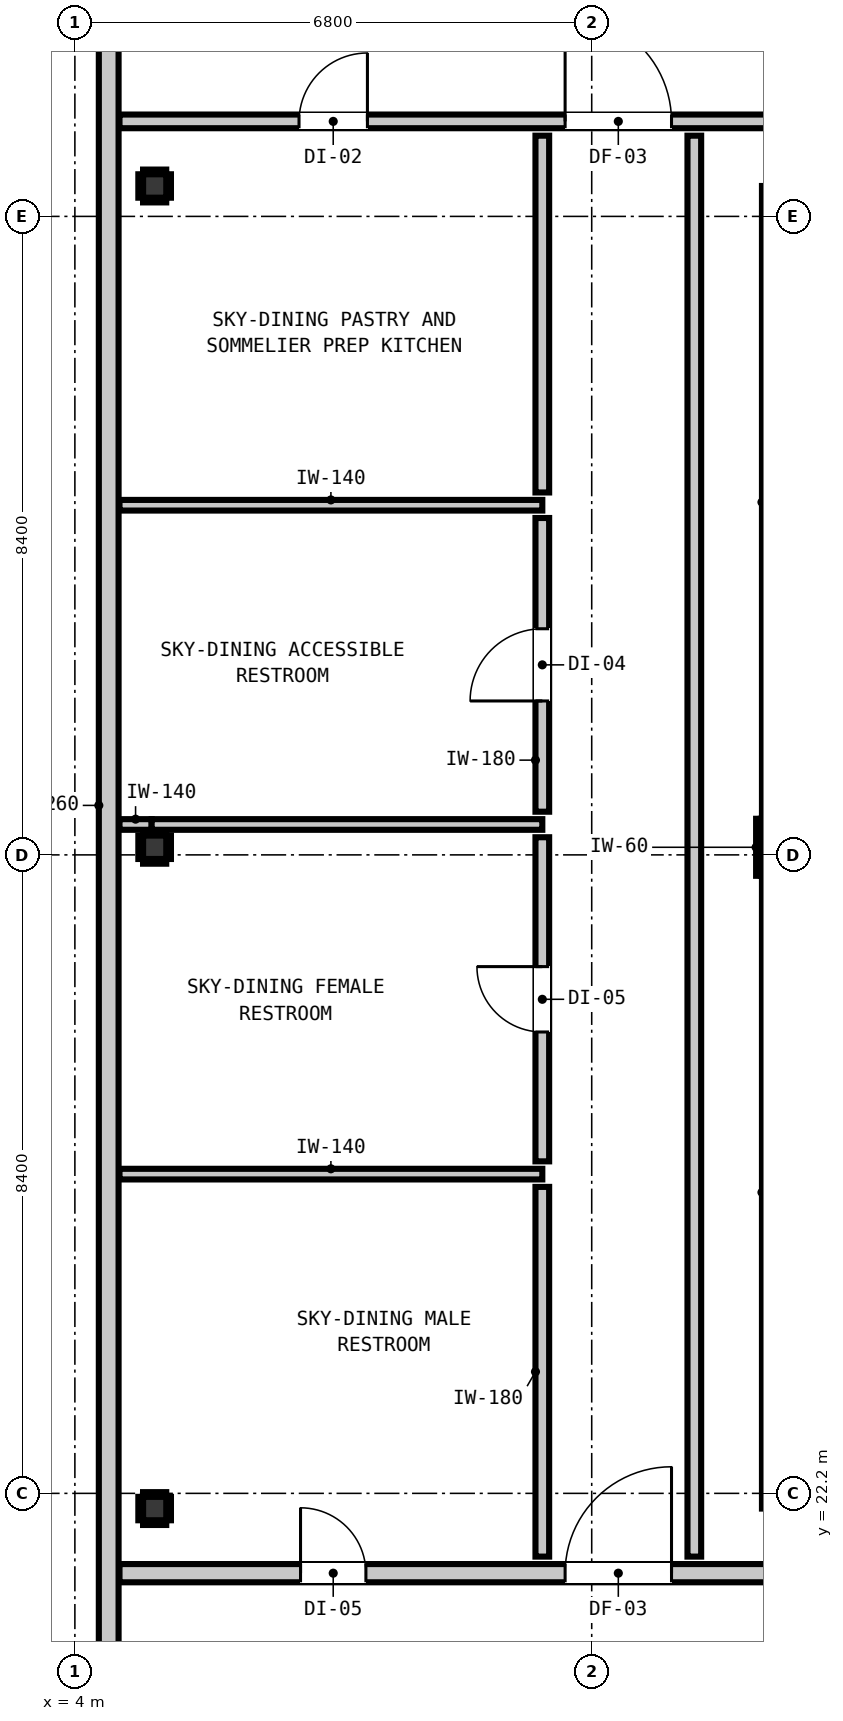
"""IFC4 building model, lengths in metres.
Left out: names, types, materials, properties, quantities, classifications, styles, units other than length and angle.
Written with IfcOpenShell. Run it as: python <this file> out.ifc"""

import sys

from ifc_helpers import new_model, si_unit, direction, frame, frame_2d, origin, origin_2d, place, context, subcontext, project, spatial, rectangle, i_section, extrude, element, fill, save


model = new_model("IFC4")
c1 = context("Model", 3, precision=1e-05, world=origin(), true_north=direction((0.0, 1.0)))
c2 = subcontext(c1, "Body", "Model", "MODEL_VIEW")
j1 = project(units=[si_unit("LENGTHUNIT", "METRE"), si_unit("PLANEANGLEUNIT", "RADIAN")], contexts=[c1])
p1 = place(None, origin())
s1 = spatial("IfcSite", under=j1, at=p1, CompositionType="ELEMENT")
p2 = place(p1, origin())
s2 = spatial("IfcBuilding", under=s1, at=p2, CompositionType="ELEMENT")
p3 = place(p2, frame((0.0, 0.0, 273.48)))
s3 = spatial("IfcBuildingStorey", under=s2, at=p3, CompositionType="ELEMENT", Elevation=273.48)
p4 = place(p3, frame((13.4, 30.7, 0.0), z_axis=(0.0, 0.0, 1.0), x_axis=(1.0, 0.0, 0.0)))
e1 = element("IfcColumn", 1, at=p4, inside=s3, PredefinedType="COLUMN", context=c2, shape_type="SweptSolid", body=[
    extrude(rectangle(XDim=0.75, YDim=0.75, at=origin_2d()), origin(), (0.0, 0.0, 1.0), 4.6),
])
p5 = place(p3, frame((13.44, 22.0, 0.0), z_axis=(0.0, 0.0, 1.0), x_axis=(0.0, 1.0, 0.0)))
e2 = element("IfcWall", 2, at=p5, inside=s3, PredefinedType="SHEAR", context=c2, shape_type="SweptSolid", body=[
    extrude(rectangle(XDim=8.32, YDim=0.8, at=frame_2d((4.16, 0.0))), origin(), (0.0, 0.0, 1.0), 4.6),
])
p6 = place(p3, frame((13.44, 31.08, 0.0), z_axis=(0.0, 0.0, 1.0), x_axis=(0.0, 1.0, 0.0)))
e3 = element("IfcWall", 3, at=p6, inside=s3, PredefinedType="SHEAR", context=c2, shape_type="SweptSolid", body=[
    extrude(rectangle(XDim=8.32, YDim=0.8, at=frame_2d((4.16, 0.0))), origin(), (0.0, 0.0, 1.0), 4.6),
])
for number, where, z_axis, x_axis in (
    (4, (5.05, 22.0, 0.0), (0.0, 0.0, 1.0), (1.0, 0.0, 0.0)),
    (5, (5.05, 30.7, 0.0), (0.0, 0.0, 1.0), (1.0, 0.0, 0.0)),
    (6, (5.05, 39.4, 0.0), (0.0, 0.0, 1.0), (1.0, 0.0, 0.0)),
):
    element("IfcColumn", number, at=place(p3, frame(where, z_axis=z_axis, x_axis=x_axis)), inside=s3, PredefinedType="COLUMN", context=c2, shape_type="SweptSolid", body=[
        extrude(i_section(OverallWidth=0.305, OverallDepth=0.308, WebThickness=0.01, FlangeThickness=0.015, at=origin_2d()), origin(), (0.0, 0.0, 1.0), 4.18),
    ])
p7 = place(p3, frame((4.445, 18.545, 0.0), z_axis=(0.0, 0.0, 1.0), x_axis=(0.0, 1.0, 0.0)))
e7 = element("IfcWall", 7, at=p7, inside=s3, PredefinedType="STANDARD", context=c2, shape_type="SweptSolid", body=[
    extrude(rectangle(XDim=30.31, YDim=0.26, at=frame_2d((15.155, 0.0))), origin(), (0.0, 0.0, 1.0), 4.18),
])
p8 = place(p7, frame((25.512, 0.0, 0.85)))
e8 = element("IfcOpeningElement", 8, at=p8, cuts=e7, PredefinedType="OPENING", context=c2, shape_type="SweptSolid", body=[
    extrude(rectangle(XDim=2.7, YDim=2.0, at=frame_2d((1.35, 1.0))), frame((0.0, 0.14, 0.0), z_axis=(0.0, -1.0, 0.0), x_axis=(1.0, 0.0, 0.0)), (0.0, 0.0, 1.0), 0.28),
])
p9 = place(p3, frame((4.587, 21.15, 0.0), z_axis=(0.0, 0.0, 1.0), x_axis=(1.0, 0.0, 0.0)))
e9 = element("IfcWall", 9, at=p9, inside=s3, PredefinedType="PARTITIONING", context=c2, shape_type="SweptSolid", body=[
    extrude(rectangle(XDim=36.626, YDim=0.24, at=frame_2d((18.313, 0.0))), origin(), (0.0, 0.0, 1.0), 4.18),
])
p10 = place(p9, frame((13.623, 0.0, 0.0)))
e10 = element("IfcOpeningElement", 10, at=p10, cuts=e9, PredefinedType="OPENING", context=c2, shape_type="SweptSolid", body=[
    extrude(rectangle(XDim=1.1, YDim=2.15, at=frame_2d((0.55, 1.075))), frame((0.0, 0.13, 0.0), z_axis=(0.0, -1.0, 0.0), x_axis=(1.0, 0.0, 0.0)), (0.0, 0.0, 1.0), 0.26),
])
p11 = place(p9, frame((5.863, 0.0, 0.0)))
e11 = element("IfcOpeningElement", 11, at=p11, cuts=e9, PredefinedType="OPENING", context=c2, shape_type="SweptSolid", body=[
    extrude(rectangle(XDim=1.4, YDim=2.15, at=frame_2d((0.7, 1.075))), frame((0.0, 0.13, 0.0), z_axis=(0.0, -1.0, 0.0), x_axis=(1.0, 0.0, 0.0)), (0.0, 0.0, 1.0), 0.26),
])
p12 = place(p9, frame((2.382, 0.0, 0.0)))
e12 = element("IfcOpeningElement", 12, at=p12, cuts=e9, PredefinedType="OPENING", context=c2, shape_type="SweptSolid", body=[
    extrude(rectangle(XDim=0.86, YDim=2.02, at=frame_2d((0.43, 1.01))), frame((0.0, 0.13, 0.0), z_axis=(0.0, -1.0, 0.0), x_axis=(1.0, 0.0, 0.0)), (0.0, 0.0, 1.0), 0.26),
])
p13 = place(p9, frame((34.414, 0.0, 0.0)))
e13 = element("IfcOpeningElement", 13, at=p13, cuts=e9, PredefinedType="OPENING", context=c2, shape_type="SweptSolid", body=[
    extrude(rectangle(XDim=0.9, YDim=2.1, at=frame_2d((0.45, 1.05))), frame((0.0, 0.13, 0.0), z_axis=(0.0, -1.0, 0.0), x_axis=(1.0, 0.0, 0.0)), (0.0, 0.0, 1.0), 0.26),
])
p14 = place(p3, frame((4.587, 40.25, 0.0), z_axis=(0.0, 0.0, 1.0), x_axis=(1.0, 0.0, 0.0)))
e14 = element("IfcWall", 14, at=p14, inside=s3, PredefinedType="PARTITIONING", context=c2, shape_type="SweptSolid", body=[
    extrude(rectangle(XDim=36.626, YDim=0.18, at=frame_2d((18.313, 0.0))), origin(), (0.0, 0.0, 1.0), 4.18),
])
p15 = place(p14, frame((12.848, 0.0, 0.0)))
e15 = element("IfcOpeningElement", 15, at=p15, cuts=e14, PredefinedType="OPENING", context=c2, shape_type="SweptSolid", body=[
    extrude(rectangle(XDim=1.4, YDim=2.15, at=frame_2d((0.7, 1.075))), frame((0.0, 0.1, 0.0), z_axis=(0.0, -1.0, 0.0), x_axis=(1.0, 0.0, 0.0)), (0.0, 0.0, 1.0), 0.2),
])
p16 = place(p14, frame((5.863, 0.0, 0.0)))
e16 = element("IfcOpeningElement", 16, at=p16, cuts=e14, PredefinedType="OPENING", context=c2, shape_type="SweptSolid", body=[
    extrude(rectangle(XDim=1.4, YDim=2.15, at=frame_2d((0.7, 1.075))), frame((0.0, 0.1, 0.0), z_axis=(0.0, -1.0, 0.0), x_axis=(1.0, 0.0, 0.0)), (0.0, 0.0, 1.0), 0.2),
])
p17 = place(p14, frame((2.362, 0.0, 0.0)))
e17 = element("IfcOpeningElement", 17, at=p17, cuts=e14, PredefinedType="OPENING", context=c2, shape_type="SweptSolid", body=[
    extrude(rectangle(XDim=0.9, YDim=2.1, at=frame_2d((0.45, 1.05))), frame((0.0, 0.1, 0.0), z_axis=(0.0, -1.0, 0.0), x_axis=(1.0, 0.0, 0.0)), (0.0, 0.0, 1.0), 0.2),
])
p18 = place(p14, frame((34.414, 0.0, 0.0)))
e18 = element("IfcOpeningElement", 18, at=p18, cuts=e14, PredefinedType="OPENING", context=c2, shape_type="SweptSolid", body=[
    extrude(rectangle(XDim=0.9, YDim=2.1, at=frame_2d((0.45, 1.05))), frame((0.0, 0.1, 0.0), z_axis=(0.0, -1.0, 0.0), x_axis=(1.0, 0.0, 0.0)), (0.0, 0.0, 1.0), 0.2),
])
p19 = place(p3, frame((4.587, 26.4, 0.0), z_axis=(0.0, 0.0, 1.0), x_axis=(1.0, 0.0, 0.0)))
e19 = element("IfcWall", 19, at=p19, inside=s3, PredefinedType="PARTITIONING", context=c2, shape_type="SweptSolid", body=[
    extrude(rectangle(XDim=5.563, YDim=0.14, at=frame_2d((2.781, 0.0))), origin(), (0.0, 0.0, 1.0), 4.18),
])
p20 = place(p3, frame((4.587, 31.0, 0.0), z_axis=(0.0, 0.0, 1.0), x_axis=(1.0, 0.0, 0.0)))
e20 = element("IfcWall", 20, at=p20, inside=s3, PredefinedType="PARTITIONING", context=c2, shape_type="SweptSolid", body=[
    extrude(rectangle(XDim=0.423, YDim=0.14, at=frame_2d((0.211, 0.0))), origin(), (0.0, 0.0, 1.0), 4.18),
])
p21 = place(p3, frame((5.01, 31.0, 0.0), z_axis=(0.0, 0.0, 1.0), x_axis=(1.0, 0.0, 0.0)))
e21 = element("IfcWall", 21, at=p21, inside=s3, PredefinedType="PARTITIONING", context=c2, shape_type="SweptSolid", body=[
    extrude(rectangle(XDim=5.14, YDim=0.14, at=frame_2d((2.57, 0.0))), origin(), (0.0, 0.0, 1.0), 1.965),
])
p22 = place(p3, frame((4.587, 35.2, 0.0), z_axis=(0.0, 0.0, 1.0), x_axis=(1.0, 0.0, 0.0)))
e22 = element("IfcWall", 22, at=p22, inside=s3, PredefinedType="PARTITIONING", context=c2, shape_type="SweptSolid", body=[
    extrude(rectangle(XDim=5.563, YDim=0.14, at=frame_2d((2.781, 0.0))), origin(), (0.0, 0.0, 1.0), 4.18),
])
p23 = place(p3, frame((10.15, 21.368, 0.0), z_axis=(0.0, 0.0, 1.0), x_axis=(0.0, 1.0, 0.0)))
e23 = element("IfcWall", 23, at=p23, inside=s3, PredefinedType="PARTITIONING", context=c2, shape_type="SweptSolid", body=[
    extrude(rectangle(XDim=4.864, YDim=0.18, at=frame_2d((2.432, 0.0))), origin(), (0.0, 0.0, 1.0), 4.18),
])
p24 = place(p3, frame((10.15, 26.568, 0.0), z_axis=(0.0, 0.0, 1.0), x_axis=(0.0, 1.0, 0.0)))
e24 = element("IfcWall", 24, at=p24, inside=s3, PredefinedType="PARTITIONING", context=c2, shape_type="SweptSolid", body=[
    extrude(rectangle(XDim=4.264, YDim=0.18, at=frame_2d((2.132, 0.0))), origin(), (0.0, 0.0, 1.0), 4.18),
])
p25 = place(p24, frame((1.702, 0.0, 0.0)))
e25 = element("IfcOpeningElement", 25, at=p25, cuts=e24, PredefinedType="OPENING", context=c2, shape_type="SweptSolid", body=[
    extrude(rectangle(XDim=0.86, YDim=2.02, at=frame_2d((0.43, 1.01))), frame((0.0, 0.1, 0.0), z_axis=(0.0, -1.0, 0.0), x_axis=(1.0, 0.0, 0.0)), (0.0, 0.0, 1.0), 0.2),
])
p26 = place(p3, frame((10.15, 31.168, 0.0), z_axis=(0.0, 0.0, 1.0), x_axis=(0.0, 1.0, 0.0)))
e26 = element("IfcWall", 26, at=p26, inside=s3, PredefinedType="PARTITIONING", context=c2, shape_type="SweptSolid", body=[
    extrude(rectangle(XDim=3.864, YDim=0.18, at=frame_2d((1.932, 0.0))), origin(), (0.0, 0.0, 1.0), 4.18),
])
p27 = place(p26, frame((1.457, 0.0, 0.0)))
e27 = element("IfcOpeningElement", 27, at=p27, cuts=e26, PredefinedType="OPENING", context=c2, shape_type="SweptSolid", body=[
    extrude(rectangle(XDim=0.95, YDim=2.1, at=frame_2d((0.475, 1.05))), frame((0.0, 0.1, 0.0), z_axis=(0.0, -1.0, 0.0), x_axis=(1.0, 0.0, 0.0)), (0.0, 0.0, 1.0), 0.2),
])
p28 = place(p3, frame((10.15, 35.368, 0.0), z_axis=(0.0, 0.0, 1.0), x_axis=(0.0, 1.0, 0.0)))
e28 = element("IfcWall", 28, at=p28, inside=s3, PredefinedType="PARTITIONING", context=c2, shape_type="SweptSolid", body=[
    extrude(rectangle(XDim=4.694, YDim=0.18, at=frame_2d((2.347, 0.0))), origin(), (0.0, 0.0, 1.0), 4.18),
])
p29 = place(p3, frame((12.15, 21.368, 0.0), z_axis=(0.0, 0.0, 1.0), x_axis=(0.0, 1.0, 0.0)))
e29 = element("IfcWall", 29, at=p29, inside=s3, PredefinedType="PARTITIONING", context=c2, shape_type="SweptSolid", body=[
    extrude(rectangle(XDim=18.694, YDim=0.18, at=frame_2d((9.347, 0.0))), origin(), (0.0, 0.0, 1.0), 4.18),
])
p30 = place(p3, frame((12.993, 30.325, 0.0), z_axis=(0.0, 0.0, 1.0), x_axis=(0.0, 1.0, 0.0)))
e30 = element("IfcWall", 30, at=p30, inside=s3, PredefinedType="PARTITIONING", context=c2, shape_type="SweptSolid", body=[
    extrude(rectangle(XDim=0.75, YDim=0.06, at=frame_2d((0.375, 0.0))), origin(), (0.0, 0.0, 1.0), 1.45),
])
for number, where, z_axis, x_axis in (
    (31, (4.897, 21.814, 0.0), (0.0, 0.0, 1.0), (1.0, 0.0, 0.0)),
    (32, (4.897, 22.186, 0.0), (0.0, 0.0, 1.0), (1.0, 0.0, 0.0)),
):
    element("IfcWall", number, at=place(p3, frame(where, z_axis=z_axis, x_axis=x_axis)), inside=s3, PredefinedType="PARTITIONING", context=c2, shape_type="SweptSolid", body=[
        extrude(rectangle(XDim=0.305, YDim=0.06, at=frame_2d((0.152, 0.0))), origin(), (0.0, 0.0, 1.0), 1.45),
    ])
for number, where, z_axis, x_axis in (
    (33, (4.865, 21.846, 0.0), (0.0, 0.0, 1.0), (0.0, 1.0, 0.0)),
    (34, (5.234, 21.846, 0.0), (0.0, 0.0, 1.0), (0.0, 1.0, 0.0)),
):
    element("IfcWall", number, at=place(p3, frame(where, z_axis=z_axis, x_axis=x_axis)), inside=s3, PredefinedType="PARTITIONING", context=c2, shape_type="SweptSolid", body=[
        extrude(rectangle(XDim=0.308, YDim=0.06, at=frame_2d((0.154, 0.0))), origin(), (0.0, 0.0, 1.0), 1.45),
    ])
for number, where, z_axis, x_axis in (
    (35, (4.897, 30.514, 0.0), (0.0, 0.0, 1.0), (1.0, 0.0, 0.0)),
    (36, (4.897, 30.886, 0.0), (0.0, 0.0, 1.0), (1.0, 0.0, 0.0)),
):
    element("IfcWall", number, at=place(p3, frame(where, z_axis=z_axis, x_axis=x_axis)), inside=s3, PredefinedType="PARTITIONING", context=c2, shape_type="SweptSolid", body=[
        extrude(rectangle(XDim=0.305, YDim=0.06, at=frame_2d((0.152, 0.0))), origin(), (0.0, 0.0, 1.0), 1.45),
    ])
for number, where, z_axis, x_axis in (
    (37, (4.865, 30.546, 0.0), (0.0, 0.0, 1.0), (0.0, 1.0, 0.0)),
    (38, (5.234, 30.546, 0.0), (0.0, 0.0, 1.0), (0.0, 1.0, 0.0)),
):
    element("IfcWall", number, at=place(p3, frame(where, z_axis=z_axis, x_axis=x_axis)), inside=s3, PredefinedType="PARTITIONING", context=c2, shape_type="SweptSolid", body=[
        extrude(rectangle(XDim=0.308, YDim=0.06, at=frame_2d((0.154, 0.0))), origin(), (0.0, 0.0, 1.0), 1.45),
    ])
for number, where, z_axis, x_axis in (
    (39, (4.897, 39.214, 0.0), (0.0, 0.0, 1.0), (1.0, 0.0, 0.0)),
    (40, (4.897, 39.586, 0.0), (0.0, 0.0, 1.0), (1.0, 0.0, 0.0)),
):
    element("IfcWall", number, at=place(p3, frame(where, z_axis=z_axis, x_axis=x_axis)), inside=s3, PredefinedType="PARTITIONING", context=c2, shape_type="SweptSolid", body=[
        extrude(rectangle(XDim=0.305, YDim=0.06, at=frame_2d((0.152, 0.0))), origin(), (0.0, 0.0, 1.0), 1.45),
    ])
for number, where, z_axis, x_axis in (
    (41, (4.865, 39.246, 0.0), (0.0, 0.0, 1.0), (0.0, 1.0, 0.0)),
    (42, (5.234, 39.246, 0.0), (0.0, 0.0, 1.0), (0.0, 1.0, 0.0)),
):
    element("IfcWall", number, at=place(p3, frame(where, z_axis=z_axis, x_axis=x_axis)), inside=s3, PredefinedType="PARTITIONING", context=c2, shape_type="SweptSolid", body=[
        extrude(rectangle(XDim=0.308, YDim=0.06, at=frame_2d((0.154, 0.0))), origin(), (0.0, 0.0, 1.0), 1.45),
    ])
p31 = place(p16, origin())
e43 = element("IfcDoor", 43, at=p31, inside=s3, OperationType="SINGLE_SWING_LEFT", PredefinedType="DOOR", context=c2, shape_type="SweptSolid", body=[
    extrude(rectangle(XDim=1.4, YDim=2.15, at=frame_2d((0.7, 1.075))), frame((0.0, 0.025, 0.0), z_axis=(0.0, -1.0, 0.0), x_axis=(1.0, 0.0, 0.0)), (0.0, 0.0, 1.0), 0.05),
])
fill(e16, e43)
p32 = place(p11, origin())
e44 = element("IfcDoor", 44, at=p32, inside=s3, OperationType="SINGLE_SWING_RIGHT", PredefinedType="DOOR", context=c2, shape_type="SweptSolid", body=[
    extrude(rectangle(XDim=1.4, YDim=2.15, at=frame_2d((0.7, 1.075))), frame((0.0, 0.025, 0.0), z_axis=(0.0, -1.0, 0.0), x_axis=(1.0, 0.0, 0.0)), (0.0, 0.0, 1.0), 0.05),
])
fill(e11, e44)
p33 = place(p12, origin())
e45 = element("IfcDoor", 45, at=p33, inside=s3, OperationType="SINGLE_SWING_LEFT", PredefinedType="DOOR", context=c2, shape_type="SweptSolid", body=[
    extrude(rectangle(XDim=0.86, YDim=2.02, at=frame_2d((0.43, 1.01))), frame((0.0, 0.025, 0.0), z_axis=(0.0, -1.0, 0.0), x_axis=(1.0, 0.0, 0.0)), (0.0, 0.0, 1.0), 0.05),
])
fill(e12, e45)
p34 = place(p25, origin())
e46 = element("IfcDoor", 46, at=p34, inside=s3, OperationType="SINGLE_SWING_RIGHT", PredefinedType="DOOR", context=c2, shape_type="SweptSolid", body=[
    extrude(rectangle(XDim=0.86, YDim=2.02, at=frame_2d((0.43, 1.01))), frame((0.0, 0.025, 0.0), z_axis=(0.0, -1.0, 0.0), x_axis=(1.0, 0.0, 0.0)), (0.0, 0.0, 1.0), 0.05),
])
fill(e25, e46)
p35 = place(p27, origin())
e47 = element("IfcDoor", 47, at=p35, inside=s3, OperationType="SINGLE_SWING_LEFT", PredefinedType="DOOR", context=c2, shape_type="SweptSolid", body=[
    extrude(rectangle(XDim=0.95, YDim=2.1, at=frame_2d((0.475, 1.05))), frame((0.0, 0.025, 0.0), z_axis=(0.0, -1.0, 0.0), x_axis=(1.0, 0.0, 0.0)), (0.0, 0.0, 1.0), 0.05),
])
fill(e27, e47)
p36 = place(p17, origin())
e48 = element("IfcDoor", 48, at=p36, inside=s3, OperationType="SINGLE_SWING_RIGHT", PredefinedType="DOOR", context=c2, shape_type="SweptSolid", body=[
    extrude(rectangle(XDim=0.9, YDim=2.1, at=frame_2d((0.45, 1.05))), frame((0.0, 0.025, 0.0), z_axis=(0.0, -1.0, 0.0), x_axis=(1.0, 0.0, 0.0)), (0.0, 0.0, 1.0), 0.05),
])
fill(e17, e48)
save(model, sys.argv[1])
